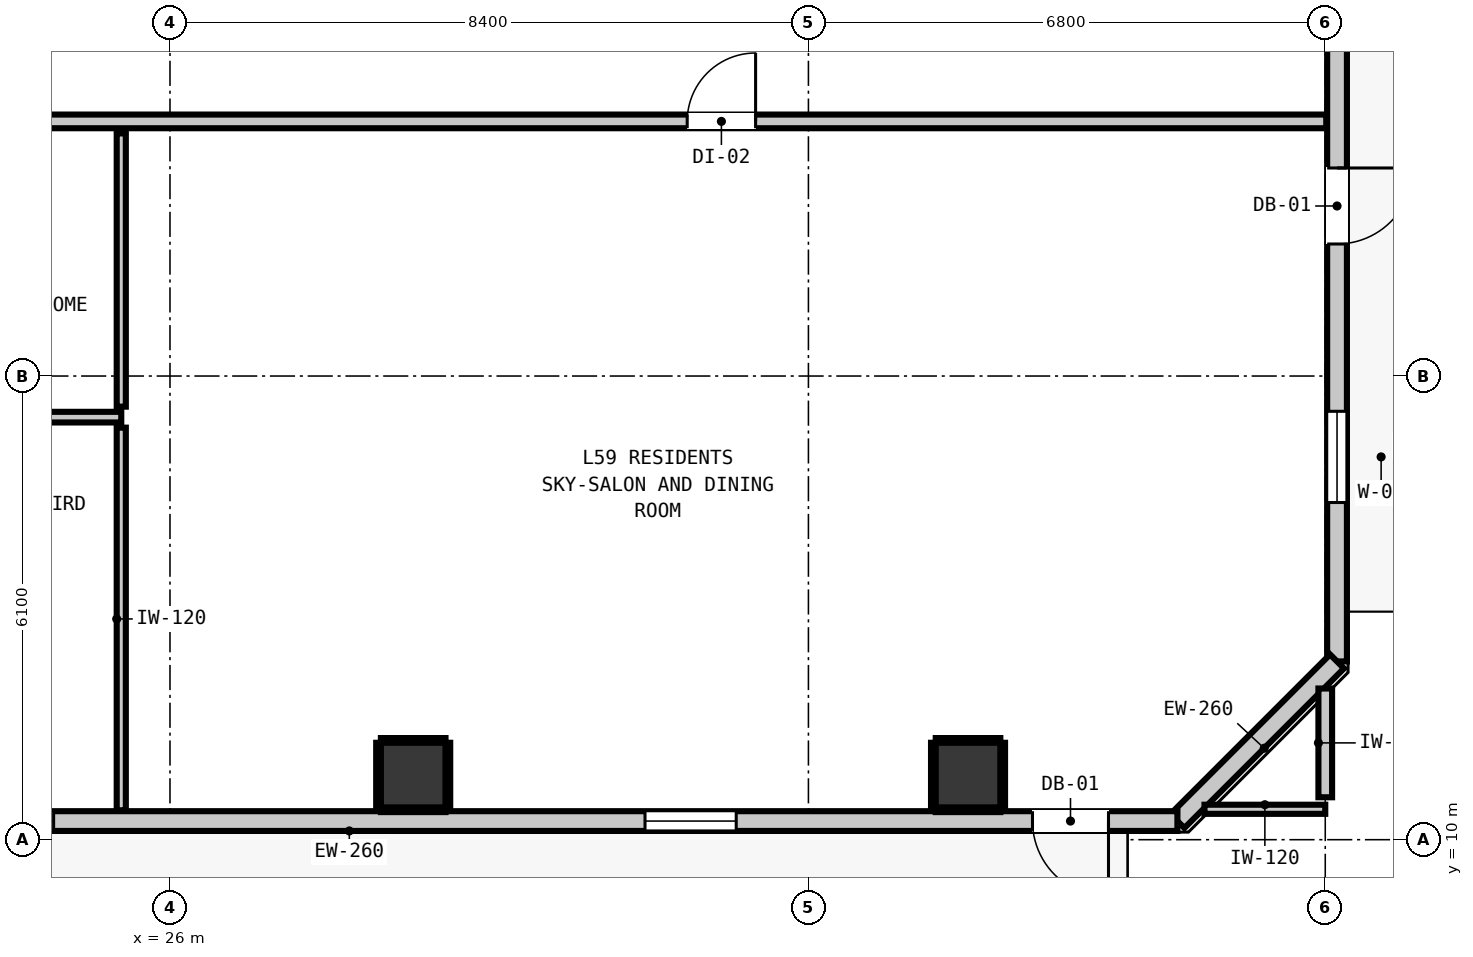
"""IFC4 building model, lengths in metres.
Left out: names, types, materials, properties, quantities, classifications, styles, units other than length and angle.
Written with IfcOpenShell. Run it as: python <this file> out.ifc"""

import sys

from ifc_helpers import new_model, si_unit, direction, frame, frame_2d, origin, origin_2d, place, context, subcontext, project, spatial, rectangle, extrude, element, fill, save


model = new_model("IFC4")
c1 = context("Model", 3, precision=1e-05, world=origin(), true_north=direction((0.0, 1.0)))
c2 = subcontext(c1, "Body", "Model", "MODEL_VIEW")
j1 = project(units=[si_unit("LENGTHUNIT", "METRE"), si_unit("PLANEANGLEUNIT", "RADIAN")], contexts=[c1])
p1 = place(None, origin())
s1 = spatial("IfcSite", under=j1, at=p1, CompositionType="ELEMENT")
p2 = place(p1, origin())
s2 = spatial("IfcBuilding", under=s1, at=p2, CompositionType="ELEMENT")
p3 = place(p2, frame((0.0, 0.0, 203.44)))
s3 = spatial("IfcBuildingStorey", under=s2, at=p3, CompositionType="ELEMENT", Elevation=203.44)
for number, where, z_axis, x_axis in (
    (1, (29.2, 10.85, 0.0), (0.0, 0.0, 1.0), (1.0, 0.0, 0.0)),
    (2, (36.5, 10.85, 0.0), (0.0, 0.0, 1.0), (1.0, 0.0, 0.0)),
):
    element("IfcColumn", number, at=place(p3, frame(where, z_axis=z_axis, x_axis=x_axis)), inside=s3, PredefinedType="COLUMN", context=c2, shape_type="SweptSolid", body=[
        extrude(rectangle(XDim=0.85, YDim=0.85, at=origin_2d()), origin(), (0.0, 0.0, 1.0), 3.32),
    ])
p4 = place(p3, frame((41.355, 42.655, 0.0), z_axis=(0.0, 0.0, 1.0), x_axis=(0.0, -1.0, 0.0)))
e3 = element("IfcWall", 3, at=p4, inside=s3, PredefinedType="STANDARD", context=c2, shape_type="SweptSolid", body=[
    extrude(rectangle(XDim=30.31, YDim=0.26, at=frame_2d((15.155, 0.0))), origin(), (0.0, 0.0, 1.0), 3.1),
])
p5 = place(p4, frame((23.818, 0.0, 0.0)))
e4 = element("IfcOpeningElement", 4, at=p5, cuts=e3, PredefinedType="OPENING", context=c2, shape_type="SweptSolid", body=[
    extrude(rectangle(XDim=1.0, YDim=2.15, at=frame_2d((0.5, 1.075))), frame((0.0, 0.14, 0.0), z_axis=(0.0, -1.0, 0.0), x_axis=(1.0, 0.0, 0.0)), (0.0, 0.0, 1.0), 0.28),
])
p6 = place(p4, frame((27.019, 0.0, 0.85)))
e5 = element("IfcOpeningElement", 5, at=p6, cuts=e3, PredefinedType="OPENING", context=c2, shape_type="SweptSolid", body=[
    extrude(rectangle(XDim=1.2, YDim=1.8, at=frame_2d((0.6, 0.9))), frame((0.0, 0.14, 0.0), z_axis=(0.0, -1.0, 0.0), x_axis=(1.0, 0.0, 0.0)), (0.0, 0.0, 1.0), 0.28),
])
p7 = place(p3, frame((41.355, 12.345, 0.0), z_axis=(0.0, 0.0, 1.0), x_axis=(-0.707147883682, -0.707065676302, 0.0)))
e6 = element("IfcWall", 6, at=p7, inside=s3, PredefinedType="STANDARD", context=c2, shape_type="SweptSolid", body=[
    extrude(rectangle(XDim=2.97, YDim=0.26, at=frame_2d((1.485, 0.0))), origin(), (0.0, 0.0, 1.0), 3.1),
])
p8 = place(p3, frame((39.255, 10.245, 0.0), z_axis=(0.0, 0.0, 1.0), x_axis=(-1.0, 0.0, 0.0)))
e7 = element("IfcWall", 7, at=p8, inside=s3, PredefinedType="STANDARD", context=c2, shape_type="SweptSolid", body=[
    extrude(rectangle(XDim=32.71, YDim=0.26, at=frame_2d((16.355, 0.0))), origin(), (0.0, 0.0, 1.0), 3.1),
])
p9 = place(p8, frame((0.907, 0.0, 0.0)))
e8 = element("IfcOpeningElement", 8, at=p9, cuts=e7, PredefinedType="OPENING", context=c2, shape_type="SweptSolid", body=[
    extrude(rectangle(XDim=1.0, YDim=2.15, at=frame_2d((0.5, 1.075))), frame((0.0, 0.14, 0.0), z_axis=(0.0, -1.0, 0.0), x_axis=(1.0, 0.0, 0.0)), (0.0, 0.0, 1.0), 0.28),
])
p10 = place(p8, frame((27.43, 0.0, 0.85)))
e9 = element("IfcOpeningElement", 9, at=p10, cuts=e7, PredefinedType="OPENING", context=c2, shape_type="SweptSolid", body=[
    extrude(rectangle(XDim=1.2, YDim=1.8, at=frame_2d((0.6, 0.9))), frame((0.0, 0.14, 0.0), z_axis=(0.0, -1.0, 0.0), x_axis=(1.0, 0.0, 0.0)), (0.0, 0.0, 1.0), 0.28),
])
p11 = place(p8, frame((30.7, 0.0, 0.85)))
e10 = element("IfcOpeningElement", 10, at=p11, cuts=e7, PredefinedType="OPENING", context=c2, shape_type="SweptSolid", body=[
    extrude(rectangle(XDim=1.2, YDim=1.8, at=frame_2d((0.6, 0.9))), frame((0.0, 0.14, 0.0), z_axis=(0.0, -1.0, 0.0), x_axis=(1.0, 0.0, 0.0)), (0.0, 0.0, 1.0), 0.28),
])
p12 = place(p8, frame((20.616, 0.0, 0.85)))
e11 = element("IfcOpeningElement", 11, at=p12, cuts=e7, PredefinedType="OPENING", context=c2, shape_type="SweptSolid", body=[
    extrude(rectangle(XDim=1.2, YDim=1.8, at=frame_2d((0.6, 0.9))), frame((0.0, 0.14, 0.0), z_axis=(0.0, -1.0, 0.0), x_axis=(1.0, 0.0, 0.0)), (0.0, 0.0, 1.0), 0.28),
])
p13 = place(p8, frame((14.786, 0.0, 0.85)))
e12 = element("IfcOpeningElement", 12, at=p13, cuts=e7, PredefinedType="OPENING", context=c2, shape_type="SweptSolid", body=[
    extrude(rectangle(XDim=1.2, YDim=1.8, at=frame_2d((0.6, 0.9))), frame((0.0, 0.14, 0.0), z_axis=(0.0, -1.0, 0.0), x_axis=(1.0, 0.0, 0.0)), (0.0, 0.0, 1.0), 0.28),
])
p14 = place(p8, frame((5.805, 0.0, 0.85)))
e13 = element("IfcOpeningElement", 13, at=p14, cuts=e7, PredefinedType="OPENING", context=c2, shape_type="SweptSolid", body=[
    extrude(rectangle(XDim=1.2, YDim=1.8, at=frame_2d((0.6, 0.9))), frame((0.0, 0.14, 0.0), z_axis=(0.0, -1.0, 0.0), x_axis=(1.0, 0.0, 0.0)), (0.0, 0.0, 1.0), 0.28),
])
p15 = place(p3, frame((4.587, 19.45, 0.0), z_axis=(0.0, 0.0, 1.0), x_axis=(1.0, 0.0, 0.0)))
e14 = element("IfcWall", 14, at=p15, inside=s3, PredefinedType="PARTITIONING", context=c2, shape_type="SweptSolid", body=[
    extrude(rectangle(XDim=36.626, YDim=0.18, at=frame_2d((18.313, 0.0))), origin(), (0.0, 0.0, 1.0), 3.1),
])
p16 = place(p15, frame((7.402, 0.0, 0.0)))
e15 = element("IfcOpeningElement", 15, at=p16, cuts=e14, PredefinedType="OPENING", context=c2, shape_type="SweptSolid", body=[
    extrude(rectangle(XDim=1.0, YDim=2.15, at=frame_2d((0.5, 1.075))), frame((0.0, 0.1, 0.0), z_axis=(0.0, -1.0, 0.0), x_axis=(1.0, 0.0, 0.0)), (0.0, 0.0, 1.0), 0.2),
])
p17 = place(p15, frame((28.218, 0.0, 0.0)))
e16 = element("IfcOpeningElement", 16, at=p17, cuts=e14, PredefinedType="OPENING", context=c2, shape_type="SweptSolid", body=[
    extrude(rectangle(XDim=0.9, YDim=2.1, at=frame_2d((0.45, 1.05))), frame((0.0, 0.1, 0.0), z_axis=(0.0, -1.0, 0.0), x_axis=(1.0, 0.0, 0.0)), (0.0, 0.0, 1.0), 0.2),
])
p18 = place(p3, frame((15.603, 15.559, 0.0), z_axis=(0.0, 0.0, 1.0), x_axis=(1.0, 0.0, 0.0)))
e17 = element("IfcWall", 17, at=p18, inside=s3, PredefinedType="PARTITIONING", context=c2, shape_type="SweptSolid", body=[
    extrude(rectangle(XDim=9.756, YDim=0.14, at=frame_2d((4.878, 0.0))), origin(), (0.0, 0.0, 1.0), 3.1),
])
p19 = place(p3, frame((39.611, 10.4, 0.0), z_axis=(0.0, 0.0, 1.0), x_axis=(1.0, 0.0, 0.0)))
e18 = element("IfcWall", 18, at=p19, inside=s3, PredefinedType="PARTITIONING", context=c2, shape_type="SweptSolid", body=[
    extrude(rectangle(XDim=1.589, YDim=0.12, at=frame_2d((0.794, 0.0))), origin(), (0.0, 0.0, 1.0), 3.1),
])
p20 = place(p3, frame((41.2, 10.558, 0.0), z_axis=(0.0, 0.0, 1.0), x_axis=(0.0, 1.0, 0.0)))
e19 = element("IfcWall", 19, at=p20, inside=s3, PredefinedType="PARTITIONING", context=c2, shape_type="SweptSolid", body=[
    extrude(rectangle(XDim=1.431, YDim=0.18, at=frame_2d((0.715, 0.0))), origin(), (0.0, 0.0, 1.0), 3.1),
])
p21 = place(p3, frame((25.359, 10.387, 0.0), z_axis=(0.0, 0.0, 1.0), x_axis=(0.0, 1.0, 0.0)))
e20 = element("IfcWall", 20, at=p21, inside=s3, PredefinedType="PARTITIONING", context=c2, shape_type="SweptSolid", body=[
    extrude(rectangle(XDim=5.034, YDim=0.12, at=frame_2d((2.517, 0.0))), origin(), (0.0, 0.0, 1.0), 3.1),
])
p22 = place(p3, frame((25.359, 15.697, 0.0), z_axis=(0.0, 0.0, 1.0), x_axis=(0.0, 1.0, 0.0)))
e21 = element("IfcWall", 21, at=p22, inside=s3, PredefinedType="PARTITIONING", context=c2, shape_type="SweptSolid", body=[
    extrude(rectangle(XDim=3.595, YDim=0.12, at=frame_2d((1.797, 0.0))), origin(), (0.0, 0.0, 1.0), 3.1),
])
for number, where, z_axis, x_axis in (
    (22, (28.775, 10.393, 0.0), (0.0, 0.0, 1.0), (1.0, 0.0, 0.0)),
    (23, (28.775, 11.307, 0.0), (0.0, 0.0, 1.0), (1.0, 0.0, 0.0)),
):
    element("IfcWall", number, at=place(p3, frame(where, z_axis=z_axis, x_axis=x_axis)), inside=s3, PredefinedType="PARTITIONING", context=c2, shape_type="SweptSolid", body=[
        extrude(rectangle(XDim=0.85, YDim=0.06, at=frame_2d((0.425, 0.0))), origin(), (0.0, 0.0, 1.0), 1.45),
    ])
for number, where, z_axis, x_axis in (
    (24, (28.743, 10.425, 0.0), (0.0, 0.0, 1.0), (0.0, 1.0, 0.0)),
    (25, (29.657, 10.425, 0.0), (0.0, 0.0, 1.0), (0.0, 1.0, 0.0)),
):
    element("IfcWall", number, at=place(p3, frame(where, z_axis=z_axis, x_axis=x_axis)), inside=s3, PredefinedType="PARTITIONING", context=c2, shape_type="SweptSolid", body=[
        extrude(rectangle(XDim=0.85, YDim=0.06, at=frame_2d((0.425, 0.0))), origin(), (0.0, 0.0, 1.0), 1.45),
    ])
for number, where, z_axis, x_axis in (
    (26, (36.075, 10.393, 0.0), (0.0, 0.0, 1.0), (1.0, 0.0, 0.0)),
    (27, (36.075, 11.307, 0.0), (0.0, 0.0, 1.0), (1.0, 0.0, 0.0)),
):
    element("IfcWall", number, at=place(p3, frame(where, z_axis=z_axis, x_axis=x_axis)), inside=s3, PredefinedType="PARTITIONING", context=c2, shape_type="SweptSolid", body=[
        extrude(rectangle(XDim=0.85, YDim=0.06, at=frame_2d((0.425, 0.0))), origin(), (0.0, 0.0, 1.0), 1.45),
    ])
for number, where, z_axis, x_axis in (
    (28, (36.043, 10.425, 0.0), (0.0, 0.0, 1.0), (0.0, 1.0, 0.0)),
    (29, (36.957, 10.425, 0.0), (0.0, 0.0, 1.0), (0.0, 1.0, 0.0)),
):
    element("IfcWall", number, at=place(p3, frame(where, z_axis=z_axis, x_axis=x_axis)), inside=s3, PredefinedType="PARTITIONING", context=c2, shape_type="SweptSolid", body=[
        extrude(rectangle(XDim=0.85, YDim=0.06, at=frame_2d((0.425, 0.0))), origin(), (0.0, 0.0, 1.0), 1.45),
    ])
p23 = place(p9, origin())
e30 = element("IfcDoor", 30, at=p23, inside=s3, OperationType="SINGLE_SWING_LEFT", PredefinedType="DOOR", context=c2, shape_type="SweptSolid", body=[
    extrude(rectangle(XDim=1.0, YDim=2.15, at=frame_2d((0.5, 1.075))), frame((0.0, 0.025, 0.0), z_axis=(0.0, -1.0, 0.0), x_axis=(1.0, 0.0, 0.0)), (0.0, 0.0, 1.0), 0.05),
])
fill(e8, e30)
p24 = place(p5, origin())
e31 = element("IfcDoor", 31, at=p24, inside=s3, OperationType="SINGLE_SWING_LEFT", PredefinedType="DOOR", context=c2, shape_type="SweptSolid", body=[
    extrude(rectangle(XDim=1.0, YDim=2.15, at=frame_2d((0.5, 1.075))), frame((0.0, 0.025, 0.0), z_axis=(0.0, -1.0, 0.0), x_axis=(1.0, 0.0, 0.0)), (0.0, 0.0, 1.0), 0.05),
])
fill(e4, e31)
p25 = place(p6, origin())
e32 = element("IfcWindow", 32, at=p25, inside=s3, PartitioningType="SINGLE_PANEL", PredefinedType="WINDOW", context=c2, shape_type="SweptSolid", body=[
    extrude(rectangle(XDim=1.2, YDim=1.8, at=frame_2d((0.6, 0.9))), frame((0.0, 0.03, 0.0), z_axis=(0.0, -1.0, 0.0), x_axis=(1.0, 0.0, 0.0)), (0.0, 0.0, 1.0), 0.06),
])
fill(e5, e32)
p26 = place(p13, origin())
e33 = element("IfcWindow", 33, at=p26, inside=s3, PartitioningType="SINGLE_PANEL", PredefinedType="WINDOW", context=c2, shape_type="SweptSolid", body=[
    extrude(rectangle(XDim=1.2, YDim=1.8, at=frame_2d((0.6, 0.9))), frame((0.0, 0.03, 0.0), z_axis=(0.0, -1.0, 0.0), x_axis=(1.0, 0.0, 0.0)), (0.0, 0.0, 1.0), 0.06),
])
fill(e12, e33)
p27 = place(p14, origin())
e34 = element("IfcWindow", 34, at=p27, inside=s3, PartitioningType="SINGLE_PANEL", PredefinedType="WINDOW", context=c2, shape_type="SweptSolid", body=[
    extrude(rectangle(XDim=1.2, YDim=1.8, at=frame_2d((0.6, 0.9))), frame((0.0, 0.03, 0.0), z_axis=(0.0, -1.0, 0.0), x_axis=(1.0, 0.0, 0.0)), (0.0, 0.0, 1.0), 0.06),
])
fill(e13, e34)
p28 = place(p17, origin())
e35 = element("IfcDoor", 35, at=p28, inside=s3, OperationType="SINGLE_SWING_RIGHT", PredefinedType="DOOR", context=c2, shape_type="SweptSolid", body=[
    extrude(rectangle(XDim=0.9, YDim=2.1, at=frame_2d((0.45, 1.05))), frame((0.0, 0.025, 0.0), z_axis=(0.0, -1.0, 0.0), x_axis=(1.0, 0.0, 0.0)), (0.0, 0.0, 1.0), 0.05),
])
fill(e16, e35)
save(model, sys.argv[1])
